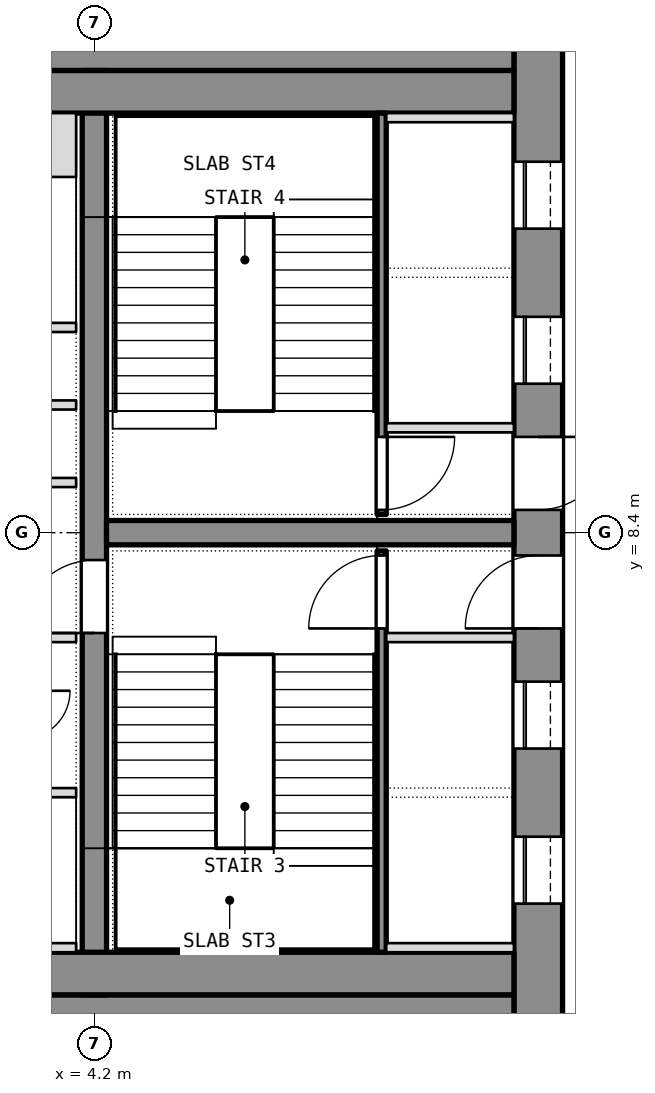
"""IFC4 building model, lengths in metres.
Left out: names, types, materials, properties, quantities, classifications, styles, units other than length and angle.
Written with IfcOpenShell. Run it as: python <this file> out.ifc"""

import sys

from ifc_helpers import new_model, si_unit, direction, frame, frame_2d, origin, place, context, subcontext, project, spatial, rectangle, extrude, element, fill, save


model = new_model("IFC4")
c1 = context("Model", 3, precision=1e-05, world=origin(), true_north=direction((0.0, 1.0)))
c2 = subcontext(c1, "Body", "Model", "MODEL_VIEW")
j1 = project(units=[si_unit("LENGTHUNIT", "METRE"), si_unit("PLANEANGLEUNIT", "RADIAN")], contexts=[c1])
p1 = place(None, origin())
s1 = spatial("IfcSite", under=j1, at=p1, CompositionType="ELEMENT")
p2 = place(p1, origin())
s2 = spatial("IfcBuilding", under=s1, at=p2, CompositionType="ELEMENT")
p3 = place(p2, frame((0.0, 0.0, 194.9)))
s3 = spatial("IfcBuildingStorey", under=s2, at=p3, CompositionType="ELEMENT", Elevation=194.9)
p4 = place(p3, frame((11.5, 0.0, 0.0), z_axis=(0.0, 0.0, 1.0), x_axis=(0.0, 1.0, 0.0)))
e1 = element("IfcWall", 1, at=p4, inside=s3, PredefinedType="SHEAR", context=c2, shape_type="SweptSolid", body=[
    extrude(rectangle(XDim=16.8, YDim=0.8, at=frame_2d((8.4, 0.0))), origin(), (0.0, 0.0, 1.0), 3.6),
])
p5 = place(p4, frame((2.3, 0.0, 0.0)))
e2 = element("IfcOpeningElement", 2, at=p5, cuts=e1, PredefinedType="OPENING", context=c2, shape_type="SweptSolid", body=[
    extrude(rectangle(XDim=1.1, YDim=2.1, at=frame_2d((0.55, 1.05))), frame((0.0, 0.4, 0.0), z_axis=(0.0, -1.0, 0.0), x_axis=(1.0, 0.0, 0.0)), (0.0, 0.0, 1.0), 0.8),
])
p6 = place(p4, frame((4.85, 0.0, 0.0)))
e3 = element("IfcOpeningElement", 3, at=p6, cuts=e1, PredefinedType="OPENING", context=c2, shape_type="SweptSolid", body=[
    extrude(rectangle(XDim=1.1, YDim=2.1, at=frame_2d((0.55, 1.05))), frame((0.0, 0.4, 0.0), z_axis=(0.0, -1.0, 0.0), x_axis=(1.0, 0.0, 0.0)), (0.0, 0.0, 1.0), 0.8),
])
p7 = place(p4, frame((6.825, 0.0, 0.0)))
e4 = element("IfcOpeningElement", 4, at=p7, cuts=e1, PredefinedType="OPENING", context=c2, shape_type="SweptSolid", body=[
    extrude(rectangle(XDim=1.2, YDim=2.1, at=frame_2d((0.6, 1.05))), frame((0.0, 0.4, 0.0), z_axis=(0.0, -1.0, 0.0), x_axis=(1.0, 0.0, 0.0)), (0.0, 0.0, 1.0), 0.8),
])
p8 = place(p4, frame((13.4, 0.0, 0.0)))
e5 = element("IfcOpeningElement", 5, at=p8, cuts=e1, PredefinedType="OPENING", context=c2, shape_type="SweptSolid", body=[
    extrude(rectangle(XDim=1.1, YDim=2.1, at=frame_2d((0.55, 1.05))), frame((0.0, 0.4, 0.0), z_axis=(0.0, -1.0, 0.0), x_axis=(1.0, 0.0, 0.0)), (0.0, 0.0, 1.0), 0.8),
])
p9 = place(p4, frame((10.85, 0.0, 0.0)))
e6 = element("IfcOpeningElement", 6, at=p9, cuts=e1, PredefinedType="OPENING", context=c2, shape_type="SweptSolid", body=[
    extrude(rectangle(XDim=1.1, YDim=2.1, at=frame_2d((0.55, 1.05))), frame((0.0, 0.4, 0.0), z_axis=(0.0, -1.0, 0.0), x_axis=(1.0, 0.0, 0.0)), (0.0, 0.0, 1.0), 0.8),
])
p10 = place(p4, frame((8.775, 0.0, 0.0)))
e7 = element("IfcOpeningElement", 7, at=p10, cuts=e1, PredefinedType="OPENING", context=c2, shape_type="SweptSolid", body=[
    extrude(rectangle(XDim=1.2, YDim=2.1, at=frame_2d((0.6, 1.05))), frame((0.0, 0.4, 0.0), z_axis=(0.0, -1.0, 0.0), x_axis=(1.0, 0.0, 0.0)), (0.0, 0.0, 1.0), 0.8),
])
for number, where, z_axis, x_axis in (
    (8, (-11.1, 0.4, 0.0), (0.0, 0.0, 1.0), (1.0, 0.0, 0.0)),
    (9, (-11.1, 16.4, 0.0), (0.0, 0.0, 1.0), (1.0, 0.0, 0.0)),
):
    element("IfcWall", number, at=place(p3, frame(where, z_axis=z_axis, x_axis=x_axis)), inside=s3, PredefinedType="SHEAR", context=c2, shape_type="SweptSolid", body=[
        extrude(rectangle(XDim=22.2, YDim=0.8, at=frame_2d((11.1, 0.0))), origin(), (0.0, 0.0, 1.0), 3.6),
    ])
p11 = place(p3, frame((4.2, 0.8, 0.0), z_axis=(0.0, 0.0, 1.0), x_axis=(0.0, 1.0, 0.0)))
e10 = element("IfcWall", 10, at=p11, inside=s3, PredefinedType="SHEAR", context=c2, shape_type="SweptSolid", body=[
    extrude(rectangle(XDim=15.2, YDim=0.4, at=frame_2d((7.6, 0.0))), origin(), (0.0, 0.0, 1.0), 3.6),
])
p12 = place(p11, frame((5.95, 0.0, 0.0)))
e11 = element("IfcOpeningElement", 11, at=p12, cuts=e10, PredefinedType="OPENING", context=c2, shape_type="SweptSolid", body=[
    extrude(rectangle(XDim=1.2, YDim=2.1, at=frame_2d((0.6, 1.05))), frame((0.0, 0.2, 0.0), z_axis=(0.0, -1.0, 0.0), x_axis=(1.0, 0.0, 0.0)), (0.0, 0.0, 1.0), 0.4),
])
p13 = place(p3, frame((4.4, 8.4, 0.0), z_axis=(0.0, 0.0, 1.0), x_axis=(1.0, 0.0, 0.0)))
e12 = element("IfcWall", 12, at=p13, inside=s3, PredefinedType="SHEAR", context=c2, shape_type="SweptSolid", body=[
    extrude(rectangle(XDim=6.7, YDim=0.4, at=frame_2d((3.35, 0.0))), origin(), (0.0, 0.0, 1.0), 3.6),
])
for number, where, z_axis, x_axis in (
    (13, (-11.1, 1.15, 0.0), (0.0, 0.0, 1.0), (1.0, 0.0, 0.0)),
    (14, (-11.1, 15.65, 0.0), (0.0, 0.0, 1.0), (1.0, 0.0, 0.0)),
):
    element("IfcWall", number, at=place(p3, frame(where, z_axis=z_axis, x_axis=x_axis)), inside=s3, PredefinedType="PARTITIONING", context=c2, shape_type="SweptSolid", body=[
        extrude(rectangle(XDim=22.2, YDim=0.7, at=frame_2d((11.1, 0.0))), origin(), (0.0, 0.0, 1.0), 3.34),
    ])
p14 = place(p3, frame((8.925, 1.5, 0.0), z_axis=(0.0, 0.0, 1.0), x_axis=(0.0, 1.0, 0.0)))
e15 = element("IfcWall", 15, at=p14, inside=s3, PredefinedType="SHEAR", context=c2, shape_type="SweptSolid", body=[
    extrude(rectangle(XDim=6.6, YDim=0.15, at=frame_2d((3.3, 0.0))), origin(), (0.0, 0.0, 1.0), 3.34),
])
p15 = place(p14, frame((5.325, 0.0, 0.0)))
e16 = element("IfcOpeningElement", 16, at=p15, cuts=e15, PredefinedType="OPENING", context=c2, shape_type="SweptSolid", body=[
    extrude(rectangle(XDim=1.2, YDim=2.1, at=frame_2d((0.6, 1.05))), frame((0.0, 0.075, 0.0), z_axis=(0.0, -1.0, 0.0), x_axis=(1.0, 0.0, 0.0)), (0.0, 0.0, 1.0), 0.15),
])
for number, where, z_axis, x_axis in (
    (17, (9.0, 6.675, 0.0), (0.0, 0.0, 1.0), (1.0, 0.0, 0.0)),
    (18, (9.0, 1.575, 0.0), (0.0, 0.0, 1.0), (1.0, 0.0, 0.0)),
):
    element("IfcWall", number, at=place(p3, frame(where, z_axis=z_axis, x_axis=x_axis)), inside=s3, PredefinedType="SHEAR", context=c2, shape_type="SweptSolid", body=[
        extrude(rectangle(XDim=2.1, YDim=0.15, at=frame_2d((1.05, 0.0))), origin(), (0.0, 0.0, 1.0), 3.6),
    ])
p16 = place(p3, frame((8.925, 8.7, 0.0), z_axis=(0.0, 0.0, 1.0), x_axis=(0.0, 1.0, 0.0)))
e19 = element("IfcWall", 19, at=p16, inside=s3, PredefinedType="SHEAR", context=c2, shape_type="SweptSolid", body=[
    extrude(rectangle(XDim=6.6, YDim=0.15, at=frame_2d((3.3, 0.0))), origin(), (0.0, 0.0, 1.0), 3.34),
])
p17 = place(p16, frame((0.075, 0.0, 0.0)))
e20 = element("IfcOpeningElement", 20, at=p17, cuts=e19, PredefinedType="OPENING", context=c2, shape_type="SweptSolid", body=[
    extrude(rectangle(XDim=1.2, YDim=2.1, at=frame_2d((0.6, 1.05))), frame((0.0, 0.075, 0.0), z_axis=(0.0, -1.0, 0.0), x_axis=(1.0, 0.0, 0.0)), (0.0, 0.0, 1.0), 0.15),
])
for number, where, z_axis, x_axis in (
    (21, (9.0, 10.125, 0.0), (0.0, 0.0, 1.0), (1.0, 0.0, 0.0)),
    (22, (9.0, 15.225, 0.0), (0.0, 0.0, 1.0), (1.0, 0.0, 0.0)),
):
    element("IfcWall", number, at=place(p3, frame(where, z_axis=z_axis, x_axis=x_axis)), inside=s3, PredefinedType="SHEAR", context=c2, shape_type="SweptSolid", body=[
        extrude(rectangle(XDim=2.1, YDim=0.15, at=frame_2d((1.05, 0.0))), origin(), (0.0, 0.0, 1.0), 3.6),
    ])
p18 = place(p3, frame((-3.9, 4.125, 0.0), z_axis=(0.0, 0.0, 1.0), x_axis=(1.0, 0.0, 0.0)))
e23 = element("IfcWall", 23, at=p18, inside=s3, PredefinedType="PARTITIONING", context=c2, shape_type="SweptSolid", body=[
    extrude(rectangle(XDim=7.8, YDim=0.15, at=frame_2d((3.9, 0.0))), origin(), (0.0, 0.0, 1.0), 3.34),
])
p19 = place(p18, frame((3.75, 0.0, 0.0)))
e24 = element("IfcOpeningElement", 24, at=p19, cuts=e23, PredefinedType="OPENING", context=c2, shape_type="SweptSolid", body=[
    extrude(rectangle(XDim=1.2, YDim=2.1, at=frame_2d((0.6, 1.05))), frame((0.0, 0.075, 0.0), z_axis=(0.0, -1.0, 0.0), x_axis=(1.0, 0.0, 0.0)), (0.0, 0.0, 1.0), 0.15),
])
p20 = place(p3, frame((-3.9, 11.775, 0.0), z_axis=(0.0, 0.0, 1.0), x_axis=(1.0, 0.0, 0.0)))
e25 = element("IfcWall", 25, at=p20, inside=s3, PredefinedType="PARTITIONING", context=c2, shape_type="SweptSolid", body=[
    extrude(rectangle(XDim=7.8, YDim=0.15, at=frame_2d((3.9, 0.0))), origin(), (0.0, 0.0, 1.0), 3.34),
])
p21 = place(p20, frame((3.3, 0.0, 0.0)))
e26 = element("IfcOpeningElement", 26, at=p21, cuts=e25, PredefinedType="OPENING", context=c2, shape_type="SweptSolid", body=[
    extrude(rectangle(XDim=1.2, YDim=2.1, at=frame_2d((0.6, 1.05))), frame((0.0, 0.075, 0.0), z_axis=(0.0, -1.0, 0.0), x_axis=(1.0, 0.0, 0.0)), (0.0, 0.0, 1.0), 0.15),
])
p22 = place(p3, frame((1.65, 1.575, 0.0), z_axis=(0.0, 0.0, 1.0), x_axis=(1.0, 0.0, 0.0)))
e27 = element("IfcWall", 27, at=p22, inside=s3, PredefinedType="SHEAR", context=c2, shape_type="SweptSolid", body=[
    extrude(rectangle(XDim=2.25, YDim=0.15, at=frame_2d((1.125, 0.0))), origin(), (0.0, 0.0, 1.0), 3.6),
])
p23 = place(p3, frame((1.65, 14.775, 0.0), z_axis=(0.0, 0.0, 1.0), x_axis=(1.0, 0.0, 0.0)))
e28 = element("IfcWall", 28, at=p23, inside=s3, PredefinedType="SHEAR", context=c2, shape_type="SweptSolid", body=[
    extrude(rectangle(XDim=2.25, YDim=1.05, at=frame_2d((1.125, 0.0))), origin(), (0.0, 0.0, 1.0), 3.6),
])
for number, where, z_axis, x_axis in (
    (29, (1.65, 6.675, 0.0), (0.0, 0.0, 1.0), (1.0, 0.0, 0.0)),
    (30, (1.65, 9.225, 0.0), (0.0, 0.0, 1.0), (1.0, 0.0, 0.0)),
):
    element("IfcWall", number, at=place(p3, frame(where, z_axis=z_axis, x_axis=x_axis)), inside=s3, PredefinedType="PARTITIONING", context=c2, shape_type="SweptSolid", body=[
        extrude(rectangle(XDim=2.25, YDim=0.15, at=frame_2d((1.125, 0.0))), origin(), (0.0, 0.0, 1.0), 3.34),
    ])
p24 = place(p3, frame((1.8, 10.5, 0.0), z_axis=(0.0, 0.0, 1.0), x_axis=(1.0, 0.0, 0.0)))
e31 = element("IfcWall", 31, at=p24, inside=s3, PredefinedType="PARTITIONING", context=c2, shape_type="SweptSolid", body=[
    extrude(rectangle(XDim=2.1, YDim=0.15, at=frame_2d((1.05, 0.0))), origin(), (0.0, 0.0, 1.0), 3.34),
])
p25 = place(p5, origin())
e32 = element("IfcDoor", 32, at=p25, inside=s3, OperationType="SLIDING_TO_LEFT", PredefinedType="DOOR", context=c2, shape_type="SweptSolid", body=[
    extrude(rectangle(XDim=1.1, YDim=2.1, at=frame_2d((0.55, 1.05))), frame((0.0, 0.025, 0.0), z_axis=(0.0, -1.0, 0.0), x_axis=(1.0, 0.0, 0.0)), (0.0, 0.0, 1.0), 0.05),
])
fill(e2, e32)
p26 = place(p6, origin())
e33 = element("IfcDoor", 33, at=p26, inside=s3, OperationType="SLIDING_TO_LEFT", PredefinedType="DOOR", context=c2, shape_type="SweptSolid", body=[
    extrude(rectangle(XDim=1.1, YDim=2.1, at=frame_2d((0.55, 1.05))), frame((0.0, 0.025, 0.0), z_axis=(0.0, -1.0, 0.0), x_axis=(1.0, 0.0, 0.0)), (0.0, 0.0, 1.0), 0.05),
])
fill(e3, e33)
p27 = place(p7, origin())
e34 = element("IfcDoor", 34, at=p27, inside=s3, OperationType="SINGLE_SWING_LEFT", PredefinedType="DOOR", context=c2, shape_type="SweptSolid", body=[
    extrude(rectangle(XDim=1.2, YDim=2.1, at=frame_2d((0.6, 1.05))), frame((0.0, 0.025, 0.0), z_axis=(0.0, -1.0, 0.0), x_axis=(1.0, 0.0, 0.0)), (0.0, 0.0, 1.0), 0.05),
])
fill(e4, e34)
p28 = place(p15, origin())
e35 = element("IfcDoor", 35, at=p28, inside=s3, OperationType="SINGLE_SWING_LEFT", PredefinedType="DOOR", context=c2, shape_type="SweptSolid", body=[
    extrude(rectangle(XDim=1.2, YDim=2.1, at=frame_2d((0.6, 1.05))), frame((0.0, 0.025, 0.0), z_axis=(0.0, -1.0, 0.0), x_axis=(1.0, 0.0, 0.0)), (0.0, 0.0, 1.0), 0.05),
])
fill(e16, e35)
p29 = place(p8, origin())
e36 = element("IfcDoor", 36, at=p29, inside=s3, OperationType="SLIDING_TO_LEFT", PredefinedType="DOOR", context=c2, shape_type="SweptSolid", body=[
    extrude(rectangle(XDim=1.1, YDim=2.1, at=frame_2d((0.55, 1.05))), frame((0.0, 0.025, 0.0), z_axis=(0.0, -1.0, 0.0), x_axis=(1.0, 0.0, 0.0)), (0.0, 0.0, 1.0), 0.05),
])
fill(e5, e36)
p30 = place(p9, origin())
e37 = element("IfcDoor", 37, at=p30, inside=s3, OperationType="SLIDING_TO_LEFT", PredefinedType="DOOR", context=c2, shape_type="SweptSolid", body=[
    extrude(rectangle(XDim=1.1, YDim=2.1, at=frame_2d((0.55, 1.05))), frame((0.0, 0.025, 0.0), z_axis=(0.0, -1.0, 0.0), x_axis=(1.0, 0.0, 0.0)), (0.0, 0.0, 1.0), 0.05),
])
fill(e6, e37)
p31 = place(p10, origin())
e38 = element("IfcDoor", 38, at=p31, inside=s3, OperationType="SINGLE_SWING_LEFT", PredefinedType="DOOR", context=c2, shape_type="SweptSolid", body=[
    extrude(rectangle(XDim=1.2, YDim=2.1, at=frame_2d((0.6, 1.05))), frame((0.0, 0.025, 0.0), z_axis=(0.0, -1.0, 0.0), x_axis=(1.0, 0.0, 0.0)), (0.0, 0.0, 1.0), 0.05),
])
fill(e7, e38)
p32 = place(p17, origin())
e39 = element("IfcDoor", 39, at=p32, inside=s3, OperationType="SINGLE_SWING_LEFT", PredefinedType="DOOR", context=c2, shape_type="SweptSolid", body=[
    extrude(rectangle(XDim=1.2, YDim=2.1, at=frame_2d((0.6, 1.05))), frame((0.0, 0.025, 0.0), z_axis=(0.0, -1.0, 0.0), x_axis=(1.0, 0.0, 0.0)), (0.0, 0.0, 1.0), 0.05),
])
fill(e20, e39)
p33 = place(p12, origin())
e40 = element("IfcDoor", 40, at=p33, inside=s3, OperationType="SINGLE_SWING_LEFT", PredefinedType="DOOR", context=c2, shape_type="SweptSolid", body=[
    extrude(rectangle(XDim=1.2, YDim=2.1, at=frame_2d((0.6, 1.05))), frame((0.0, 0.025, 0.0), z_axis=(0.0, -1.0, 0.0), x_axis=(1.0, 0.0, 0.0)), (0.0, 0.0, 1.0), 0.05),
])
fill(e11, e40)
save(model, sys.argv[1])
